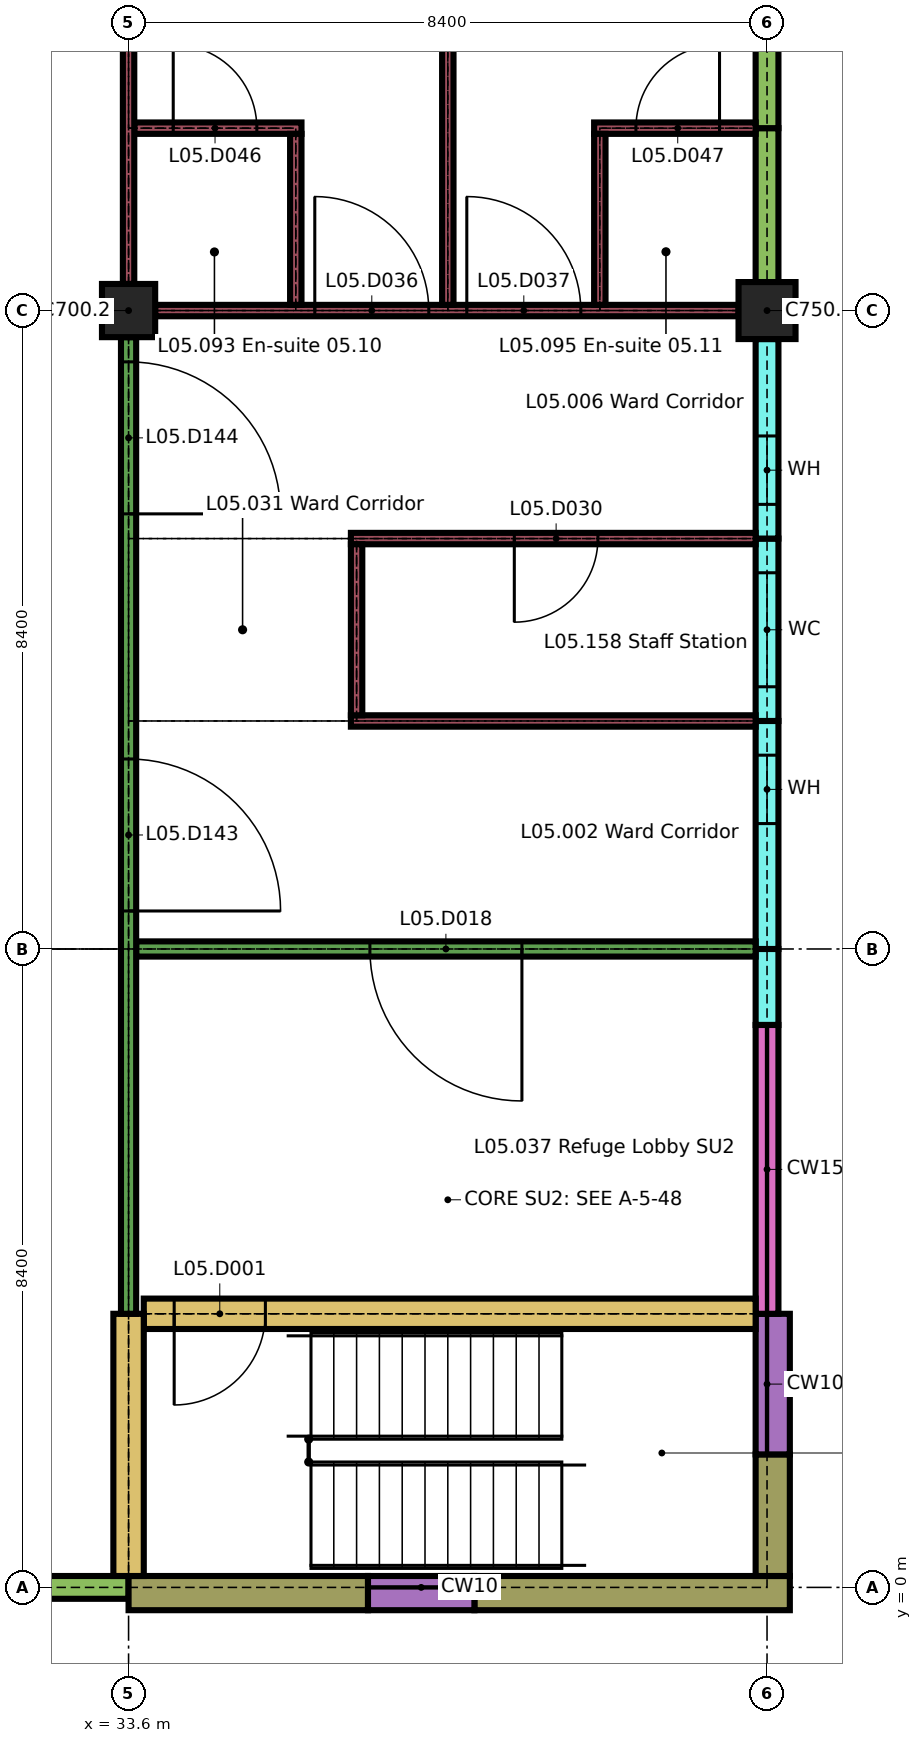
"""IFC4 building model, lengths in metres.
Left out: names, types, materials, properties, quantities, classifications, styles, units other than length and angle.
Written with IfcOpenShell. Run it as: python <this file> out.ifc"""

import sys

from ifc_helpers import new_model, si_unit, direction, frame, frame_2d, origin, origin_2d, place, context, subcontext, project, spatial, rectangle, extrude, element, fill, save


model = new_model("IFC4")
c1 = context("Model", 3, precision=1e-05, world=origin(), true_north=direction((0.0, 1.0)))
c2 = subcontext(c1, "Body", "Model", "MODEL_VIEW")
j1 = project(units=[si_unit("LENGTHUNIT", "METRE"), si_unit("PLANEANGLEUNIT", "RADIAN")], contexts=[c1])
p1 = place(None, origin())
s1 = spatial("IfcSite", under=j1, at=p1, CompositionType="ELEMENT")
p2 = place(p1, origin())
s2 = spatial("IfcBuilding", under=s1, at=p2, CompositionType="ELEMENT")
p3 = place(p2, frame((0.0, 0.0, 22.5)))
s3 = spatial("IfcBuildingStorey", under=s2, at=p3, CompositionType="ELEMENT", Elevation=22.5)
p4 = place(p3, frame((33.6, 16.8, 0.0), z_axis=(0.0, 0.0, 1.0), x_axis=(1.0, 0.0, 0.0)))
e1 = element("IfcColumn", 1, at=p4, inside=s3, PredefinedType="COLUMN", context=c2, shape_type="SweptSolid", body=[
    extrude(rectangle(XDim=0.7, YDim=0.7, at=origin_2d()), origin(), (0.0, 0.0, 1.0), 3.26),
])
p5 = place(p3, frame((42.0, 16.8, 0.0), z_axis=(0.0, 0.0, 1.0), x_axis=(1.0, 0.0, 0.0)))
e2 = element("IfcColumn", 2, at=p5, inside=s3, PredefinedType="COLUMN", context=c2, shape_type="SweptSolid", body=[
    extrude(rectangle(XDim=0.75, YDim=0.75, at=origin_2d()), origin(), (0.0, 0.0, 1.0), 3.26),
])
p6 = place(p3, frame((32.3, 0.0, 0.0), z_axis=(0.0, 0.0, 1.0), x_axis=(1.0, 0.0, 0.0)))
e3 = element("IfcWall", 3, at=p6, inside=s3, PredefinedType="SOLIDWALL", context=c2, shape_type="SweptSolid", body=[
    extrude(rectangle(XDim=1.3, YDim=0.3, at=frame_2d((0.65, 0.0))), origin(), (0.0, 0.0, 1.0), 2.96),
])
p7 = place(p3, frame((33.6, -0.075, 0.0), z_axis=(0.0, 0.0, 1.0), x_axis=(1.0, 0.0, 0.0)))
e4 = element("IfcWall", 4, at=p7, inside=s3, PredefinedType="SOLIDWALL", context=c2, shape_type="SweptSolid", body=[
    extrude(rectangle(XDim=3.15, YDim=0.45, at=frame_2d((1.575, 0.0))), origin(), (0.0, 0.0, 1.0), 3.26),
])
p8 = place(p3, frame((38.15, -0.075, 0.0), z_axis=(0.0, 0.0, 1.0), x_axis=(1.0, 0.0, 0.0)))
e5 = element("IfcWall", 5, at=p8, inside=s3, PredefinedType="SOLIDWALL", context=c2, shape_type="SweptSolid", body=[
    extrude(rectangle(XDim=4.15, YDim=0.45, at=frame_2d((2.075, 0.0))), origin(), (0.0, 0.0, 1.0), 3.26),
])
p9 = place(p3, frame((36.75, -0.075, 0.0), z_axis=(0.0, 0.0, 1.0), x_axis=(1.0, 0.0, 0.0)))
e6 = element("IfcWall", 6, at=p9, inside=s3, PredefinedType="SOLIDWALL", context=c2, shape_type="SweptSolid", body=[
    extrude(rectangle(XDim=1.4, YDim=0.45, at=frame_2d((0.7, 0.0))), origin(), (0.0, 0.0, 1.0), 0.6),
])
p10 = place(p3, frame((42.075, 0.15, 0.0), z_axis=(0.0, 0.0, 1.0), x_axis=(0.0, 1.0, 0.0)))
e7 = element("IfcWall", 7, at=p10, inside=s3, PredefinedType="SOLIDWALL", context=c2, shape_type="SweptSolid", body=[
    extrude(rectangle(XDim=1.6, YDim=0.45, at=frame_2d((0.8, 0.0))), origin(), (0.0, 0.0, 1.0), 3.26),
])
p11 = place(p3, frame((42.075, 1.75, 0.0), z_axis=(0.0, 0.0, 1.0), x_axis=(0.0, 1.0, 0.0)))
e8 = element("IfcWall", 8, at=p11, inside=s3, PredefinedType="SOLIDWALL", context=c2, shape_type="SweptSolid", body=[
    extrude(rectangle(XDim=1.85, YDim=0.45, at=frame_2d((0.925, 0.0))), origin(), (0.0, 0.0, 1.0), 0.6),
])
p12 = place(p3, frame((42.0, 7.4, 0.0), z_axis=(0.0, 0.0, 1.0), x_axis=(0.0, 1.0, 0.0)))
e9 = element("IfcWall", 9, at=p12, inside=s3, PredefinedType="SOLIDWALL", context=c2, shape_type="SweptSolid", body=[
    extrude(rectangle(XDim=1.0, YDim=0.3, at=frame_2d((0.5, 0.0))), origin(), (0.0, 0.0, 1.0), 3.26),
])
p13 = place(p3, frame((42.0, 3.6, 0.0), z_axis=(0.0, 0.0, 1.0), x_axis=(0.0, 1.0, 0.0)))
e10 = element("IfcWall", 10, at=p13, inside=s3, PredefinedType="SOLIDWALL", context=c2, shape_type="SweptSolid", body=[
    extrude(rectangle(XDim=3.8, YDim=0.3, at=frame_2d((1.9, 0.0))), origin(), (0.0, 0.0, 1.0), 0.6),
])
p14 = place(p3, frame((42.0, 8.4, 0.0), z_axis=(0.0, 0.0, 1.0), x_axis=(0.0, 1.0, 0.0)))
e11 = element("IfcWall", 11, at=p14, inside=s3, PredefinedType="SOLIDWALL", context=c2, shape_type="SweptSolid", body=[
    extrude(rectangle(XDim=3.0, YDim=0.3, at=frame_2d((1.5, 0.0))), origin(), (0.0, 0.0, 1.0), 3.26),
])
p15 = place(p14, frame((1.65, 0.0, 0.9)))
e12 = element("IfcOpeningElement", 12, at=p15, cuts=e11, PredefinedType="OPENING", context=c2, shape_type="SweptSolid", body=[
    extrude(rectangle(XDim=0.9, YDim=1.5, at=frame_2d((0.45, 0.75))), frame((0.0, 0.16, 0.0), z_axis=(0.0, -1.0, 0.0), x_axis=(1.0, 0.0, 0.0)), (0.0, 0.0, 1.0), 0.32),
])
p16 = place(p3, frame((42.0, 11.4, 0.0), z_axis=(0.0, 0.0, 1.0), x_axis=(0.0, 1.0, 0.0)))
e13 = element("IfcWall", 13, at=p16, inside=s3, PredefinedType="SOLIDWALL", context=c2, shape_type="SweptSolid", body=[
    extrude(rectangle(XDim=2.4, YDim=0.3, at=frame_2d((1.2, 0.0))), origin(), (0.0, 0.0, 1.0), 3.26),
])
p17 = place(p16, frame((0.45, 0.0, 0.9)))
e14 = element("IfcOpeningElement", 14, at=p17, cuts=e13, PredefinedType="OPENING", context=c2, shape_type="SweptSolid", body=[
    extrude(rectangle(XDim=1.5, YDim=1.5, at=frame_2d((0.75, 0.75))), frame((0.0, 0.16, 0.0), z_axis=(0.0, -1.0, 0.0), x_axis=(1.0, 0.0, 0.0)), (0.0, 0.0, 1.0), 0.32),
])
p18 = place(p3, frame((42.0, 13.8, 0.0), z_axis=(0.0, 0.0, 1.0), x_axis=(0.0, 1.0, 0.0)))
e15 = element("IfcWall", 15, at=p18, inside=s3, PredefinedType="SOLIDWALL", context=c2, shape_type="SweptSolid", body=[
    extrude(rectangle(XDim=2.625, YDim=0.3, at=frame_2d((1.312, 0.0))), origin(), (0.0, 0.0, 1.0), 3.26),
])
p19 = place(p18, frame((0.45, 0.0, 0.9)))
e16 = element("IfcOpeningElement", 16, at=p19, cuts=e15, PredefinedType="OPENING", context=c2, shape_type="SweptSolid", body=[
    extrude(rectangle(XDim=0.9, YDim=1.5, at=frame_2d((0.45, 0.75))), frame((0.0, 0.16, 0.0), z_axis=(0.0, -1.0, 0.0), x_axis=(1.0, 0.0, 0.0)), (0.0, 0.0, 1.0), 0.32),
])
p20 = place(p3, frame((42.0, 17.175, 0.0), z_axis=(0.0, 0.0, 1.0), x_axis=(0.0, 1.0, 0.0)))
e17 = element("IfcWall", 17, at=p20, inside=s3, PredefinedType="SOLIDWALL", context=c2, shape_type="SweptSolid", body=[
    extrude(rectangle(XDim=2.025, YDim=0.3, at=frame_2d((1.012, 0.0))), origin(), (0.0, 0.0, 1.0), 2.96),
])
p21 = place(p3, frame((42.0, 19.2, 0.0), z_axis=(0.0, 0.0, 1.0), x_axis=(0.0, 1.0, 0.0)))
e18 = element("IfcWall", 18, at=p21, inside=s3, PredefinedType="SOLIDWALL", context=c2, shape_type="SweptSolid", body=[
    extrude(rectangle(XDim=5.625, YDim=0.3, at=frame_2d((2.812, 0.0))), origin(), (0.0, 0.0, 1.0), 2.96),
])
p22 = place(p21, frame((2.85, 0.0, 0.9)))
e19 = element("IfcOpeningElement", 19, at=p22, cuts=e18, PredefinedType="OPENING", context=c2, shape_type="SweptSolid", body=[
    extrude(rectangle(XDim=2.1, YDim=1.5, at=frame_2d((1.05, 0.75))), frame((0.0, 0.16, 0.0), z_axis=(0.0, -1.0, 0.0), x_axis=(1.0, 0.0, 0.0)), (0.0, 0.0, 1.0), 0.32),
])
p23 = place(p3, frame((33.8, 3.6, 0.0), z_axis=(0.0, 0.0, 1.0), x_axis=(1.0, 0.0, 0.0)))
e20 = element("IfcWall", 20, at=p23, inside=s3, PredefinedType="SHEAR", context=c2, shape_type="SweptSolid", body=[
    extrude(rectangle(XDim=8.05, YDim=0.4, at=frame_2d((4.025, 0.0))), origin(), (0.0, 0.0, 1.0), 3.26),
])
p24 = place(p23, frame((0.4, 0.0, 0.0)))
e21 = element("IfcOpeningElement", 21, at=p24, cuts=e20, PredefinedType="OPENING", context=c2, shape_type="SweptSolid", body=[
    extrude(rectangle(XDim=1.2, YDim=2.1, at=frame_2d((0.6, 1.05))), frame((0.0, 0.21, 0.0), z_axis=(0.0, -1.0, 0.0), x_axis=(1.0, 0.0, 0.0)), (0.0, 0.0, 1.0), 0.42),
])
p25 = place(p3, frame((33.7, 8.4, 0.0), z_axis=(0.0, 0.0, 1.0), x_axis=(1.0, 0.0, 0.0)))
e22 = element("IfcWall", 22, at=p25, inside=s3, PredefinedType="PARTITIONING", context=c2, shape_type="SweptSolid", body=[
    extrude(rectangle(XDim=8.15, YDim=0.2, at=frame_2d((4.075, 0.0))), origin(), (0.0, 0.0, 1.0), 3.26),
])
p26 = place(p25, frame((3.075, 0.0, 0.0)))
e23 = element("IfcOpeningElement", 23, at=p26, cuts=e22, PredefinedType="OPENING", context=c2, shape_type="SweptSolid", body=[
    extrude(rectangle(XDim=2.0, YDim=2.4, at=frame_2d((1.0, 1.2))), frame((0.0, 0.11, 0.0), z_axis=(0.0, -1.0, 0.0), x_axis=(1.0, 0.0, 0.0)), (0.0, 0.0, 1.0), 0.22),
])
p27 = place(p3, frame((36.525, 11.4, 0.0), z_axis=(0.0, 0.0, 1.0), x_axis=(1.0, 0.0, 0.0)))
e24 = element("IfcWall", 24, at=p27, inside=s3, PredefinedType="PARTITIONING", context=c2, shape_type="SweptSolid", body=[
    extrude(rectangle(XDim=5.325, YDim=0.15, at=frame_2d((2.663, 0.0))), origin(), (0.0, 0.0, 1.0), 3.26),
])
p28 = place(p3, frame((36.525, 13.8, 0.0), z_axis=(0.0, 0.0, 1.0), x_axis=(1.0, 0.0, 0.0)))
e25 = element("IfcWall", 25, at=p28, inside=s3, PredefinedType="PARTITIONING", context=c2, shape_type="SweptSolid", body=[
    extrude(rectangle(XDim=5.325, YDim=0.15, at=frame_2d((2.663, 0.0))), origin(), (0.0, 0.0, 1.0), 3.26),
])
p29 = place(p28, frame((2.15, 0.0, 0.0)))
e26 = element("IfcOpeningElement", 26, at=p29, cuts=e25, PredefinedType="OPENING", context=c2, shape_type="SweptSolid", body=[
    extrude(rectangle(XDim=1.1, YDim=2.1, at=frame_2d((0.55, 1.05))), frame((0.0, 0.085, 0.0), z_axis=(0.0, -1.0, 0.0), x_axis=(1.0, 0.0, 0.0)), (0.0, 0.0, 1.0), 0.17),
])
p30 = place(p3, frame((33.95, 16.8, 0.0), z_axis=(0.0, 0.0, 1.0), x_axis=(1.0, 0.0, 0.0)))
e27 = element("IfcWall", 27, at=p30, inside=s3, PredefinedType="PARTITIONING", context=c2, shape_type="SweptSolid", body=[
    extrude(rectangle(XDim=7.675, YDim=0.15, at=frame_2d((3.837, 0.0))), origin(), (0.0, 0.0, 1.0), 3.26),
])
p31 = place(p30, frame((2.1, 0.0, 0.0)))
e28 = element("IfcOpeningElement", 28, at=p31, cuts=e27, PredefinedType="OPENING", context=c2, shape_type="SweptSolid", body=[
    extrude(rectangle(XDim=1.5, YDim=2.4, at=frame_2d((0.75, 1.2))), frame((0.0, 0.085, 0.0), z_axis=(0.0, -1.0, 0.0), x_axis=(1.0, 0.0, 0.0)), (0.0, 0.0, 1.0), 0.17),
])
p32 = place(p30, frame((4.1, 0.0, 0.0)))
e29 = element("IfcOpeningElement", 29, at=p32, cuts=e27, PredefinedType="OPENING", context=c2, shape_type="SweptSolid", body=[
    extrude(rectangle(XDim=1.5, YDim=2.4, at=frame_2d((0.75, 1.2))), frame((0.0, 0.085, 0.0), z_axis=(0.0, -1.0, 0.0), x_axis=(1.0, 0.0, 0.0)), (0.0, 0.0, 1.0), 0.17),
])
p33 = place(p3, frame((33.675, 19.2, 0.0), z_axis=(0.0, 0.0, 1.0), x_axis=(1.0, 0.0, 0.0)))
e30 = element("IfcWall", 30, at=p33, inside=s3, PredefinedType="PARTITIONING", context=c2, shape_type="SweptSolid", body=[
    extrude(rectangle(XDim=2.2, YDim=0.15, at=frame_2d((1.1, 0.0))), origin(), (0.0, 0.0, 1.0), 3.26),
])
p34 = place(p33, frame((0.512, 0.0, 0.0)))
e31 = element("IfcOpeningElement", 31, at=p34, cuts=e30, PredefinedType="OPENING", context=c2, shape_type="SweptSolid", body=[
    extrude(rectangle(XDim=1.1, YDim=2.1, at=frame_2d((0.55, 1.05))), frame((0.0, 0.085, 0.0), z_axis=(0.0, -1.0, 0.0), x_axis=(1.0, 0.0, 0.0)), (0.0, 0.0, 1.0), 0.17),
])
p35 = place(p3, frame((39.725, 19.2, 0.0), z_axis=(0.0, 0.0, 1.0), x_axis=(1.0, 0.0, 0.0)))
e32 = element("IfcWall", 32, at=p35, inside=s3, PredefinedType="PARTITIONING", context=c2, shape_type="SweptSolid", body=[
    extrude(rectangle(XDim=2.125, YDim=0.15, at=frame_2d((1.062, 0.0))), origin(), (0.0, 0.0, 1.0), 3.26),
])
p36 = place(p35, frame((0.55, 0.0, 0.0)))
e33 = element("IfcOpeningElement", 33, at=p36, cuts=e32, PredefinedType="OPENING", context=c2, shape_type="SweptSolid", body=[
    extrude(rectangle(XDim=1.1, YDim=2.1, at=frame_2d((0.55, 1.05))), frame((0.0, 0.085, 0.0), z_axis=(0.0, -1.0, 0.0), x_axis=(1.0, 0.0, 0.0)), (0.0, 0.0, 1.0), 0.17),
])
p37 = place(p3, frame((33.6, 0.15, 0.0), z_axis=(0.0, 0.0, 1.0), x_axis=(0.0, 1.0, 0.0)))
e34 = element("IfcWall", 34, at=p37, inside=s3, PredefinedType="SHEAR", context=c2, shape_type="SweptSolid", body=[
    extrude(rectangle(XDim=3.45, YDim=0.4, at=frame_2d((1.725, 0.0))), origin(), (0.0, 0.0, 1.0), 3.26),
])
p38 = place(p3, frame((33.6, 3.6, 0.0), z_axis=(0.0, 0.0, 1.0), x_axis=(0.0, 1.0, 0.0)))
e35 = element("IfcWall", 35, at=p38, inside=s3, PredefinedType="PARTITIONING", context=c2, shape_type="SweptSolid", body=[
    extrude(rectangle(XDim=12.85, YDim=0.2, at=frame_2d((6.425, 0.0))), origin(), (0.0, 0.0, 1.0), 3.26),
])
p39 = place(p38, frame((5.3, 0.0, 0.0)))
e36 = element("IfcOpeningElement", 36, at=p39, cuts=e35, PredefinedType="OPENING", context=c2, shape_type="SweptSolid", body=[
    extrude(rectangle(XDim=2.0, YDim=2.4, at=frame_2d((1.0, 1.2))), frame((0.0, 0.11, 0.0), z_axis=(0.0, -1.0, 0.0), x_axis=(1.0, 0.0, 0.0)), (0.0, 0.0, 1.0), 0.22),
])
p40 = place(p38, frame((10.525, 0.0, 0.0)))
e37 = element("IfcOpeningElement", 37, at=p40, cuts=e35, PredefinedType="OPENING", context=c2, shape_type="SweptSolid", body=[
    extrude(rectangle(XDim=2.0, YDim=2.4, at=frame_2d((1.0, 1.2))), frame((0.0, 0.11, 0.0), z_axis=(0.0, -1.0, 0.0), x_axis=(1.0, 0.0, 0.0)), (0.0, 0.0, 1.0), 0.22),
])
p41 = place(p3, frame((33.6, 17.15, 0.0), z_axis=(0.0, 0.0, 1.0), x_axis=(0.0, 1.0, 0.0)))
e38 = element("IfcWall", 38, at=p41, inside=s3, PredefinedType="PARTITIONING", context=c2, shape_type="SweptSolid", body=[
    extrude(rectangle(XDim=7.7, YDim=0.15, at=frame_2d((3.85, 0.0))), origin(), (0.0, 0.0, 1.0), 3.26),
])
for number, where, z_axis, x_axis in (
    (39, (35.8, 16.875, 0.0), (0.0, 0.0, 1.0), (0.0, 1.0, 0.0)),
    (40, (36.6, 11.475, 0.0), (0.0, 0.0, 1.0), (0.0, 1.0, 0.0)),
):
    element("IfcWall", number, at=place(p3, frame(where, z_axis=z_axis, x_axis=x_axis)), inside=s3, PredefinedType="PARTITIONING", context=c2, shape_type="SweptSolid", body=[
        extrude(rectangle(XDim=2.25, YDim=0.15, at=frame_2d((1.125, 0.0))), origin(), (0.0, 0.0, 1.0), 3.26),
    ])
p42 = place(p3, frame((37.8, 16.875, 0.0), z_axis=(0.0, 0.0, 1.0), x_axis=(0.0, 1.0, 0.0)))
e41 = element("IfcWall", 41, at=p42, inside=s3, PredefinedType="PARTITIONING", context=c2, shape_type="SweptSolid", body=[
    extrude(rectangle(XDim=8.175, YDim=0.15, at=frame_2d((4.087, 0.0))), origin(), (0.0, 0.0, 1.0), 3.26),
])
p43 = place(p3, frame((39.8, 16.875, 0.0), z_axis=(0.0, 0.0, 1.0), x_axis=(0.0, 1.0, 0.0)))
e42 = element("IfcWall", 42, at=p43, inside=s3, PredefinedType="PARTITIONING", context=c2, shape_type="SweptSolid", body=[
    extrude(rectangle(XDim=2.25, YDim=0.15, at=frame_2d((1.125, 0.0))), origin(), (0.0, 0.0, 1.0), 3.26),
])
p44 = place(p15, origin())
e43 = element("IfcWindow", 43, at=p44, inside=s3, PartitioningType="SINGLE_PANEL", PredefinedType="WINDOW", context=c2, shape_type="SweptSolid", body=[
    extrude(rectangle(XDim=0.9, YDim=1.5, at=frame_2d((0.45, 0.75))), frame((0.0, 0.03, 0.0), z_axis=(0.0, -1.0, 0.0), x_axis=(1.0, 0.0, 0.0)), (0.0, 0.0, 1.0), 0.06),
])
fill(e12, e43)
p45 = place(p17, origin())
e44 = element("IfcWindow", 44, at=p45, inside=s3, PartitioningType="SINGLE_PANEL", PredefinedType="WINDOW", context=c2, shape_type="SweptSolid", body=[
    extrude(rectangle(XDim=1.5, YDim=1.5, at=frame_2d((0.75, 0.75))), frame((0.0, 0.03, 0.0), z_axis=(0.0, -1.0, 0.0), x_axis=(1.0, 0.0, 0.0)), (0.0, 0.0, 1.0), 0.06),
])
fill(e14, e44)
p46 = place(p19, origin())
e45 = element("IfcWindow", 45, at=p46, inside=s3, PartitioningType="SINGLE_PANEL", PredefinedType="WINDOW", context=c2, shape_type="SweptSolid", body=[
    extrude(rectangle(XDim=0.9, YDim=1.5, at=frame_2d((0.45, 0.75))), frame((0.0, 0.03, 0.0), z_axis=(0.0, -1.0, 0.0), x_axis=(1.0, 0.0, 0.0)), (0.0, 0.0, 1.0), 0.06),
])
fill(e16, e45)
p47 = place(p24, origin())
e46 = element("IfcDoor", 46, at=p47, inside=s3, OperationType="SINGLE_SWING_LEFT", PredefinedType="DOOR", context=c2, shape_type="SweptSolid", body=[
    extrude(rectangle(XDim=1.2, YDim=2.1, at=frame_2d((0.6, 1.05))), frame((0.0, 0.025, 0.0), z_axis=(0.0, -1.0, 0.0), x_axis=(1.0, 0.0, 0.0)), (0.0, 0.0, 1.0), 0.05),
])
fill(e21, e46)
p48 = place(p26, origin())
e47 = element("IfcDoor", 47, at=p48, inside=s3, OperationType="SINGLE_SWING_RIGHT", PredefinedType="DOOR", context=c2, shape_type="SweptSolid", body=[
    extrude(rectangle(XDim=2.0, YDim=2.4, at=frame_2d((1.0, 1.2))), frame((0.0, 0.03, 0.0), z_axis=(0.0, -1.0, 0.0), x_axis=(1.0, 0.0, 0.0)), (0.0, 0.0, 1.0), 0.06),
])
fill(e23, e47)
p49 = place(p29, origin())
e48 = element("IfcDoor", 48, at=p49, inside=s3, OperationType="SINGLE_SWING_LEFT", PredefinedType="DOOR", context=c2, shape_type="SweptSolid", body=[
    extrude(rectangle(XDim=1.1, YDim=2.1, at=frame_2d((0.55, 1.05))), frame((0.0, 0.025, 0.0), z_axis=(0.0, -1.0, 0.0), x_axis=(1.0, 0.0, 0.0)), (0.0, 0.0, 1.0), 0.05),
])
fill(e26, e48)
p50 = place(p31, origin())
e49 = element("IfcDoor", 49, at=p50, inside=s3, OperationType="SINGLE_SWING_RIGHT", PredefinedType="DOOR", context=c2, shape_type="SweptSolid", body=[
    extrude(rectangle(XDim=1.5, YDim=2.4, at=frame_2d((0.75, 1.2))), frame((0.0, 0.03, 0.0), z_axis=(0.0, -1.0, 0.0), x_axis=(1.0, 0.0, 0.0)), (0.0, 0.0, 1.0), 0.06),
])
fill(e28, e49)
p51 = place(p32, origin())
e50 = element("IfcDoor", 50, at=p51, inside=s3, OperationType="SINGLE_SWING_RIGHT", PredefinedType="DOOR", context=c2, shape_type="SweptSolid", body=[
    extrude(rectangle(XDim=1.5, YDim=2.4, at=frame_2d((0.75, 1.2))), frame((0.0, 0.03, 0.0), z_axis=(0.0, -1.0, 0.0), x_axis=(1.0, 0.0, 0.0)), (0.0, 0.0, 1.0), 0.06),
])
fill(e29, e50)
p52 = place(p34, origin())
e51 = element("IfcDoor", 51, at=p52, inside=s3, OperationType="SINGLE_SWING_RIGHT", PredefinedType="DOOR", context=c2, shape_type="SweptSolid", body=[
    extrude(rectangle(XDim=1.1, YDim=2.1, at=frame_2d((0.55, 1.05))), frame((0.0, 0.025, 0.0), z_axis=(0.0, -1.0, 0.0), x_axis=(1.0, 0.0, 0.0)), (0.0, 0.0, 1.0), 0.05),
])
fill(e31, e51)
p53 = place(p36, origin())
e52 = element("IfcDoor", 52, at=p53, inside=s3, OperationType="SINGLE_SWING_LEFT", PredefinedType="DOOR", context=c2, shape_type="SweptSolid", body=[
    extrude(rectangle(XDim=1.1, YDim=2.1, at=frame_2d((0.55, 1.05))), frame((0.0, 0.025, 0.0), z_axis=(0.0, -1.0, 0.0), x_axis=(1.0, 0.0, 0.0)), (0.0, 0.0, 1.0), 0.05),
])
fill(e33, e52)
p54 = place(p39, origin())
e53 = element("IfcDoor", 53, at=p54, inside=s3, OperationType="SINGLE_SWING_LEFT", PredefinedType="DOOR", context=c2, shape_type="SweptSolid", body=[
    extrude(rectangle(XDim=2.0, YDim=2.4, at=frame_2d((1.0, 1.2))), frame((0.0, 0.03, 0.0), z_axis=(0.0, -1.0, 0.0), x_axis=(1.0, 0.0, 0.0)), (0.0, 0.0, 1.0), 0.06),
])
fill(e36, e53)
p55 = place(p40, origin())
e54 = element("IfcDoor", 54, at=p55, inside=s3, OperationType="SINGLE_SWING_LEFT", PredefinedType="DOOR", context=c2, shape_type="SweptSolid", body=[
    extrude(rectangle(XDim=2.0, YDim=2.4, at=frame_2d((1.0, 1.2))), frame((0.0, 0.03, 0.0), z_axis=(0.0, -1.0, 0.0), x_axis=(1.0, 0.0, 0.0)), (0.0, 0.0, 1.0), 0.06),
])
fill(e37, e54)
save(model, sys.argv[1])
